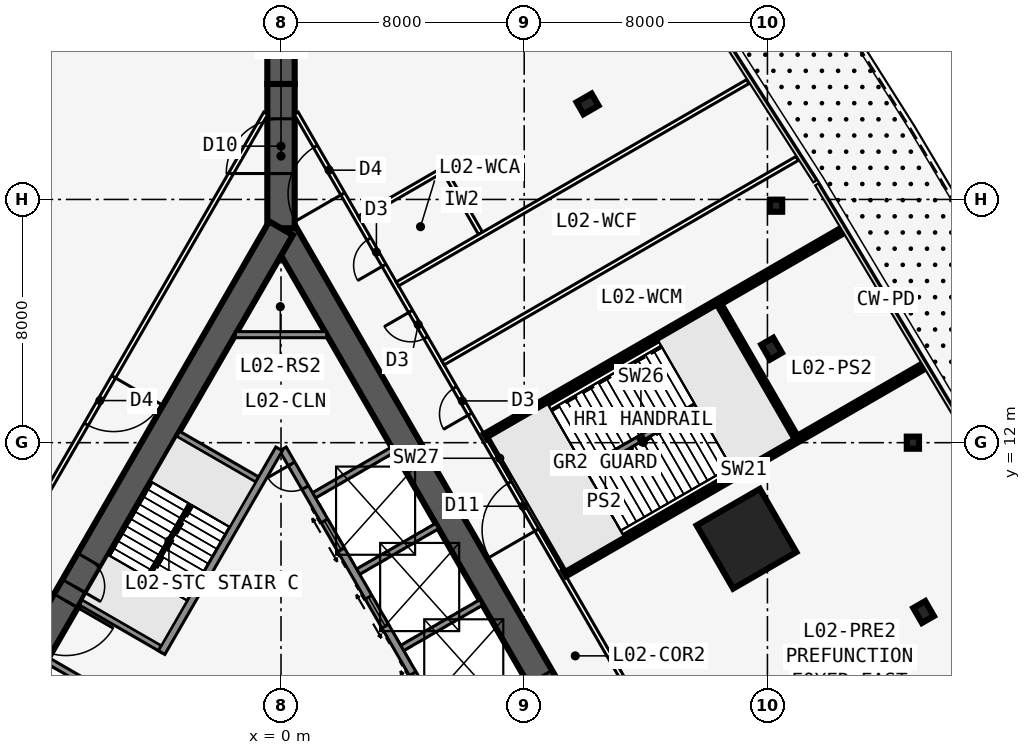
"""IFC4 building model, lengths in metres.
Left out: names, types, materials, properties, quantities, classifications, styles, units other than length and angle.
Written with IfcOpenShell. Run it as: python <this file> out.ifc"""

import sys

from ifc_helpers import new_model, si_unit, direction, frame, frame_2d, origin, origin_2d, place, context, subcontext, project, spatial, rectangle, i_section, extrude, element, fill, save


model = new_model("IFC4")
c1 = context("Model", 3, precision=1e-05, world=origin(), true_north=direction((0.0, 1.0)))
c2 = subcontext(c1, "Body", "Model", "MODEL_VIEW")
j1 = project(units=[si_unit("LENGTHUNIT", "METRE"), si_unit("PLANEANGLEUNIT", "RADIAN")], contexts=[c1])
p1 = place(None, origin())
s1 = spatial("IfcSite", under=j1, at=p1, CompositionType="ELEMENT")
p2 = place(p1, origin())
s2 = spatial("IfcBuilding", under=s1, at=p2, CompositionType="ELEMENT")
p3 = place(p2, frame((0.0, 0.0, 11.0)))
s3 = spatial("IfcBuildingStorey", under=s2, at=p3, CompositionType="ELEMENT", Elevation=11.0)
p4 = place(p3, frame((16.5, -9.526, 0.0), z_axis=(0.0, 0.0, 1.0), x_axis=(-0.499999749417, 0.866025548458, 0.0)))
e1 = element("IfcWall", 1, at=p4, inside=s3, PredefinedType="SHEAR", context=c2, shape_type="SweptSolid", body=[
    extrude(rectangle(XDim=33.0, YDim=0.9, at=frame_2d((16.5, 0.0))), origin(), (0.0, 0.0, 1.0), 6.5),
])
p5 = place(p4, frame((14.15, 0.0, 0.0)))
e2 = element("IfcOpeningElement", 2, at=p5, cuts=e1, PredefinedType="OPENING", context=c2, shape_type="SweptSolid", body=[
    extrude(rectangle(XDim=1.8, YDim=2.13, at=frame_2d((0.9, 1.065))), frame((0.0, 0.46, 0.0), z_axis=(0.0, -1.0, 0.0), x_axis=(1.0, 0.0, 0.0)), (0.0, 0.0, 1.0), 0.92),
])
p6 = place(p4, frame((12.6, 0.0, 0.0)))
e3 = element("IfcOpeningElement", 3, at=p6, cuts=e1, PredefinedType="OPENING", context=c2, shape_type="SweptSolid", body=[
    extrude(rectangle(XDim=1.0, YDim=2.13, at=frame_2d((0.5, 1.065))), frame((0.0, 0.46, 0.0), z_axis=(0.0, -1.0, 0.0), x_axis=(1.0, 0.0, 0.0)), (0.0, 0.0, 1.0), 0.92),
])
p7 = place(p3, frame((5.379, 2.586, 0.0), z_axis=(0.0, 0.0, 1.0), x_axis=(-0.500001375892, 0.866024609411, 0.0)))
e4 = element("IfcWall", 4, at=p7, inside=s3, PredefinedType="SOLIDWALL", context=c2, shape_type="SweptSolid", body=[
    extrude(rectangle(XDim=10.633, YDim=0.25, at=frame_2d((5.316, 0.0))), origin(), (0.0, 0.0, 1.0), 6.25),
])
p8 = place(p7, frame((9.164, 0.0, 0.0)))
e5 = element("IfcOpeningElement", 5, at=p8, cuts=e4, PredefinedType="OPENING", context=c2, shape_type="SweptSolid", body=[
    extrude(rectangle(XDim=0.9, YDim=2.13, at=frame_2d((0.45, 1.065))), frame((0.0, 0.135, 0.0), z_axis=(0.0, -1.0, 0.0), x_axis=(1.0, 0.0, 0.0)), (0.0, 0.0, 1.0), 0.27),
])
p9 = place(p7, frame((1.0, 0.0, 0.0)))
e6 = element("IfcOpeningElement", 6, at=p9, cuts=e4, PredefinedType="OPENING", context=c2, shape_type="SweptSolid", body=[
    extrude(rectangle(XDim=1.1, YDim=2.13, at=frame_2d((0.55, 1.065))), frame((0.0, 0.135, 0.0), z_axis=(0.0, -1.0, 0.0), x_axis=(1.0, 0.0, 0.0)), (0.0, 0.0, 1.0), 0.27),
])
p10 = place(p7, frame((3.9, 0.0, 0.0)))
e7 = element("IfcOpeningElement", 7, at=p10, cuts=e4, PredefinedType="OPENING", context=c2, shape_type="SweptSolid", body=[
    extrude(rectangle(XDim=1.1, YDim=2.13, at=frame_2d((0.55, 1.065))), frame((0.0, 0.135, 0.0), z_axis=(0.0, -1.0, 0.0), x_axis=(1.0, 0.0, 0.0)), (0.0, 0.0, 1.0), 0.27),
])
p11 = place(p7, frame((6.8, 0.0, 0.0)))
e8 = element("IfcOpeningElement", 8, at=p11, cuts=e4, PredefinedType="OPENING", context=c2, shape_type="SweptSolid", body=[
    extrude(rectangle(XDim=1.1, YDim=2.13, at=frame_2d((0.55, 1.065))), frame((0.0, 0.135, 0.0), z_axis=(0.0, -1.0, 0.0), x_axis=(1.0, 0.0, 0.0)), (0.0, 0.0, 1.0), 0.27),
])
for number, where, z_axis, x_axis in (
    (9, (3.879, 5.184, 0.0), (0.0, 0.0, 1.0), (0.866, 0.5, 0.0)),
    (10, (2.429, 7.696, 0.0), (0.0, 0.0, 1.0), (0.866, 0.5, 0.0)),
    (11, (0.979, 10.207, 0.0), (0.0, 0.0, 1.0), (0.866, 0.5, 0.0)),
):
    element("IfcWall", number, at=place(p3, frame(where, z_axis=z_axis, x_axis=x_axis)), inside=s3, PredefinedType="SOLIDWALL", context=c2, shape_type="SweptSolid", body=[
        extrude(rectangle(XDim=3.125, YDim=0.2, at=frame_2d((1.562, 0.0))), origin(), (0.0, 0.0, 1.0), 6.25),
    ])
p12 = place(p3, frame((0.0, 19.052, 0.0), z_axis=(0.0, 0.0, 1.0), x_axis=(-0.499999749417, -0.866025548458, 0.0)))
e12 = element("IfcWall", 12, at=p12, inside=s3, PredefinedType="SHEAR", context=c2, shape_type="SweptSolid", body=[
    extrude(rectangle(XDim=33.0, YDim=0.9, at=frame_2d((16.5, 0.0))), origin(), (0.0, 0.0, 1.0), 6.5),
])
p13 = place(p12, frame((14.15, 0.0, 0.0)))
e13 = element("IfcOpeningElement", 13, at=p13, cuts=e12, PredefinedType="OPENING", context=c2, shape_type="SweptSolid", body=[
    extrude(rectangle(XDim=1.8, YDim=2.13, at=frame_2d((0.9, 1.065))), frame((0.0, 0.46, 0.0), z_axis=(0.0, -1.0, 0.0), x_axis=(1.0, 0.0, 0.0)), (0.0, 0.0, 1.0), 0.92),
])
p14 = place(p12, frame((12.6, 0.0, 0.0)))
e14 = element("IfcOpeningElement", 14, at=p14, cuts=e12, PredefinedType="OPENING", context=c2, shape_type="SweptSolid", body=[
    extrude(rectangle(XDim=1.0, YDim=2.13, at=frame_2d((0.5, 1.065))), frame((0.0, 0.46, 0.0), z_axis=(0.0, -1.0, 0.0), x_axis=(1.0, 0.0, 0.0)), (0.0, 0.0, 1.0), 0.92),
])
p15 = place(p3, frame((-0.062, 11.794, 0.0), z_axis=(0.0, 0.0, 1.0), x_axis=(-0.500006680225, -0.86602154692, 0.0)))
e15 = element("IfcWall", 15, at=p15, inside=s3, PredefinedType="SOLIDWALL", context=c2, shape_type="SweptSolid", body=[
    extrude(rectangle(XDim=7.733, YDim=0.25, at=frame_2d((3.866, 0.0))), origin(), (0.0, 0.0, 1.0), 6.25),
])
for number, where, z_axis, x_axis in (
    (16, (-0.679, 10.727, 0.0), (0.0, 0.0, 1.0), (-0.866, 0.5, 0.0)),
    (17, (-3.879, 5.184, 0.0), (0.0, 0.0, 1.0), (-0.866, 0.5, 0.0)),
    (18, (-4.979, 3.279, 0.0), (0.0, 0.0, 1.0), (-0.866, 0.5, 0.0)),
):
    element("IfcWall", number, at=place(p3, frame(where, z_axis=z_axis, x_axis=x_axis)), inside=s3, PredefinedType="SOLIDWALL", context=c2, shape_type="SweptSolid", body=[
        extrude(rectangle(XDim=3.125, YDim=0.2, at=frame_2d((1.562, 0.0))), origin(), (0.0, 0.0, 1.0), 6.25),
    ])
p16 = place(p3, frame((0.0, 19.052, 0.0), z_axis=(0.0, 0.0, 1.0), x_axis=(0.0, 1.0, 0.0)))
e19 = element("IfcWall", 19, at=p16, inside=s3, PredefinedType="SHEAR", context=c2, shape_type="SweptSolid", body=[
    extrude(rectangle(XDim=4.746, YDim=0.9, at=frame_2d((2.373, 0.0))), origin(), (0.0, 0.0, 1.0), 6.5),
])
p17 = place(p16, frame((1.8, 0.0, 0.0)))
e20 = element("IfcOpeningElement", 20, at=p17, cuts=e19, PredefinedType="OPENING", context=c2, shape_type="SweptSolid", body=[
    extrude(rectangle(XDim=1.8, YDim=2.13, at=frame_2d((0.9, 1.065))), frame((0.0, 0.46, 0.0), z_axis=(0.0, -1.0, 0.0), x_axis=(1.0, 0.0, 0.0)), (0.0, 0.0, 1.0), 0.92),
])
p18 = place(p3, frame((0.0, 23.799, 0.0), z_axis=(0.0, 0.0, 1.0), x_axis=(0.0, 1.0, 0.0)))
e21 = element("IfcWall", 21, at=p18, inside=s3, PredefinedType="SHEAR", context=c2, shape_type="SweptSolid", body=[
    extrude(rectangle(XDim=1.155, YDim=0.9, at=frame_2d((0.577, 0.0))), origin(), (0.0, 0.0, 1.0), 6.5),
])
for number, where, z_axis, x_axis in (
    (22, (21.137, 6.43, 0.0), (0.0, 0.0, 1.0), (0.866, 0.5, 0.0)),
    (23, (16.137, 15.09, 0.0), (0.0, 0.0, 1.0), (0.866, 0.5, 0.0)),
    (24, (10.083, 23.142, 0.0), (0.0, 0.0, 1.0), (-0.5, 0.866, 0.0)),
):
    element("IfcColumn", number, at=place(p3, frame(where, z_axis=z_axis, x_axis=x_axis)), inside=s3, PredefinedType="COLUMN", context=c2, shape_type="SweptSolid", body=[
        extrude(i_section(OverallWidth=0.455, OverallDepth=0.569, WebThickness=0.078, FlangeThickness=0.125, at=origin_2d()), origin(), (0.0, 0.0, 1.0), 6.5),
    ])
for number, where, z_axis, x_axis in (
    (25, (20.785, 12.0, 0.0), (0.0, 0.0, 1.0), (1.0, 0.0, 0.0)),
    (26, (16.285, 19.794, 0.0), (0.0, 0.0, 1.0), (1.0, 0.0, 0.0)),
):
    element("IfcColumn", number, at=place(p3, frame(where, z_axis=z_axis, x_axis=x_axis)), inside=s3, PredefinedType="COLUMN", context=c2, shape_type="SweptSolid", body=[
        extrude(i_section(OverallWidth=0.401, OverallDepth=0.399, WebThickness=0.025, FlangeThickness=0.04, at=origin_2d()), origin(), (0.0, 0.0, 1.0), 6.5),
    ])
p19 = place(p3, frame((15.312, 8.84, 0.0), z_axis=(0.0, 0.0, 1.0), x_axis=(0.866025403784, 0.5, 0.0)))
e27 = element("IfcColumn", 27, at=p19, inside=s3, PredefinedType="COLUMN", context=c2, shape_type="SweptSolid", body=[
    extrude(rectangle(XDim=2.4, YDim=2.4, at=origin_2d()), origin(), (0.0, 0.0, 1.0), 6.5),
])
p20 = place(p3, frame((20.027, -10.985, 0.0), z_axis=(0.0, 0.0, 1.0), x_axis=(-0.500001677587, 0.866024435227, 0.0)))
e28 = element("IfcWall", 28, at=p20, inside=s3, PredefinedType="PARTITIONING", context=c2, shape_type="SweptSolid", body=[
    extrude(rectangle(XDim=39.054, YDim=0.15, at=frame_2d((19.527, 0.0))), origin(), (0.0, 0.0, 1.0), 5.308),
])
p21 = place(p20, frame((10.013, 0.0, 0.0)))
e29 = element("IfcOpeningElement", 29, at=p21, cuts=e28, PredefinedType="OPENING", context=c2, shape_type="SweptSolid", body=[
    extrude(rectangle(XDim=1.8, YDim=2.13, at=frame_2d((0.9, 1.065))), frame((0.0, 0.085, 0.0), z_axis=(0.0, -1.0, 0.0), x_axis=(1.0, 0.0, 0.0)), (0.0, 0.0, 1.0), 0.17),
])
p22 = place(p20, frame((23.227, 0.0, 0.0)))
e30 = element("IfcOpeningElement", 30, at=p22, cuts=e28, PredefinedType="OPENING", context=c2, shape_type="SweptSolid", body=[
    extrude(rectangle(XDim=1.8, YDim=2.13, at=frame_2d((0.9, 1.065))), frame((0.0, 0.085, 0.0), z_axis=(0.0, -1.0, 0.0), x_axis=(1.0, 0.0, 0.0)), (0.0, 0.0, 1.0), 0.17),
])
p23 = place(p20, frame((27.627, 0.0, 0.0)))
e31 = element("IfcOpeningElement", 31, at=p23, cuts=e28, PredefinedType="OPENING", context=c2, shape_type="SweptSolid", body=[
    extrude(rectangle(XDim=1.0, YDim=2.13, at=frame_2d((0.5, 1.065))), frame((0.0, 0.085, 0.0), z_axis=(0.0, -1.0, 0.0), x_axis=(1.0, 0.0, 0.0)), (0.0, 0.0, 1.0), 0.17),
])
p24 = place(p20, frame((30.527, 0.0, 0.0)))
e32 = element("IfcOpeningElement", 32, at=p24, cuts=e28, PredefinedType="OPENING", context=c2, shape_type="SweptSolid", body=[
    extrude(rectangle(XDim=1.0, YDim=2.13, at=frame_2d((0.5, 1.065))), frame((0.0, 0.085, 0.0), z_axis=(0.0, -1.0, 0.0), x_axis=(1.0, 0.0, 0.0)), (0.0, 0.0, 1.0), 0.17),
])
p25 = place(p20, frame((33.277, 0.0, 0.0)))
e33 = element("IfcOpeningElement", 33, at=p25, cuts=e28, PredefinedType="OPENING", context=c2, shape_type="SweptSolid", body=[
    extrude(rectangle(XDim=1.0, YDim=2.13, at=frame_2d((0.5, 1.065))), frame((0.0, 0.085, 0.0), z_axis=(0.0, -1.0, 0.0), x_axis=(1.0, 0.0, 0.0)), (0.0, 0.0, 1.0), 0.17),
])
p26 = place(p20, frame((35.99, 0.0, 0.0)))
e34 = element("IfcOpeningElement", 34, at=p26, cuts=e28, PredefinedType="OPENING", context=c2, shape_type="SweptSolid", body=[
    extrude(rectangle(XDim=1.8, YDim=2.13, at=frame_2d((0.9, 1.065))), frame((0.0, 0.085, 0.0), z_axis=(0.0, -1.0, 0.0), x_axis=(1.0, 0.0, 0.0)), (0.0, 0.0, 1.0), 0.17),
])
p27 = place(p3, frame((9.329, 7.695, 0.0), z_axis=(0.0, 0.0, 1.0), x_axis=(0.866029620801, 0.499992695841, 0.0)))
e35 = element("IfcWall", 35, at=p27, inside=s3, PredefinedType="SHEAR", context=c2, shape_type="SweptSolid", body=[
    extrude(rectangle(XDim=13.607, YDim=0.2, at=frame_2d((6.804, 0.0))), origin(), (0.0, 0.0, 1.0), 6.5),
])
p28 = place(p3, frame((6.729, 12.198, 0.0), z_axis=(0.0, 0.0, 1.0), x_axis=(0.866022969634, 0.500004216049, 0.0)))
e36 = element("IfcWall", 36, at=p28, inside=s3, PredefinedType="SHEAR", context=c2, shape_type="SweptSolid", body=[
    extrude(rectangle(XDim=13.526, YDim=0.2, at=frame_2d((6.763, 0.0))), origin(), (0.0, 0.0, 1.0), 6.5),
])
p29 = place(p3, frame((5.329, 14.623, 0.0), z_axis=(0.0, 0.0, 1.0), x_axis=(0.866024753221, 0.500001126807, 0.0)))
e37 = element("IfcWall", 37, at=p29, inside=s3, PredefinedType="PARTITIONING", context=c2, shape_type="SweptSolid", body=[
    extrude(rectangle(XDim=13.448, YDim=0.15, at=frame_2d((6.724, 0.0))), origin(), (0.0, 0.0, 1.0), 5.308),
])
p30 = place(p3, frame((3.829, 17.221, 0.0), z_axis=(0.0, 0.0, 1.0), x_axis=(0.866019382877, 0.500010428373, 0.0)))
e38 = element("IfcWall", 38, at=p30, inside=s3, PredefinedType="PARTITIONING", context=c2, shape_type="SweptSolid", body=[
    extrude(rectangle(XDim=13.307, YDim=0.15, at=frame_2d((6.654, 0.0))), origin(), (0.0, 0.0, 1.0), 6.25),
])
p31 = place(p3, frame((6.562, 18.886, 0.0), z_axis=(0.0, 0.0, 1.0), x_axis=(-0.500004234368, 0.866022959057, 0.0)))
e39 = element("IfcWall", 39, at=p31, inside=s3, PredefinedType="PARTITIONING", context=c2, shape_type="SweptSolid", body=[
    extrude(rectangle(XDim=2.5, YDim=0.15, at=frame_2d((1.25, 0.0))), origin(), (0.0, 0.0, 1.0), 6.25),
])
p32 = place(p3, frame((2.579, 19.386, 0.0), z_axis=(0.0, 0.0, 1.0), x_axis=(0.866022959057, 0.500004234368, 0.0)))
e40 = element("IfcWall", 40, at=p32, inside=s3, PredefinedType="PARTITIONING", context=c2, shape_type="SweptSolid", body=[
    extrude(rectangle(XDim=3.125, YDim=0.15, at=frame_2d((1.562, 0.0))), origin(), (0.0, 0.0, 1.0), 6.25),
])
p33 = place(p3, frame((-0.5, 22.836, 0.0), z_axis=(0.0, 0.0, 1.0), x_axis=(-0.500001677587, -0.866024435227, 0.0)))
e41 = element("IfcWall", 41, at=p33, inside=s3, PredefinedType="PARTITIONING", context=c2, shape_type="SweptSolid", body=[
    extrude(rectangle(XDim=39.054, YDim=0.15, at=frame_2d((19.527, 0.0))), origin(), (0.0, 0.0, 1.0), 5.308),
])
p34 = place(p33, frame((10.013, 0.0, 0.0)))
e42 = element("IfcOpeningElement", 42, at=p34, cuts=e41, PredefinedType="OPENING", context=c2, shape_type="SweptSolid", body=[
    extrude(rectangle(XDim=1.8, YDim=2.13, at=frame_2d((0.9, 1.065))), frame((0.0, 0.085, 0.0), z_axis=(0.0, -1.0, 0.0), x_axis=(1.0, 0.0, 0.0)), (0.0, 0.0, 1.0), 0.17),
])
p35 = place(p33, frame((23.227, 0.0, 0.0)))
e43 = element("IfcOpeningElement", 43, at=p35, cuts=e41, PredefinedType="OPENING", context=c2, shape_type="SweptSolid", body=[
    extrude(rectangle(XDim=1.8, YDim=2.13, at=frame_2d((0.9, 1.065))), frame((0.0, 0.085, 0.0), z_axis=(0.0, -1.0, 0.0), x_axis=(1.0, 0.0, 0.0)), (0.0, 0.0, 1.0), 0.17),
])
p36 = place(p33, frame((27.627, 0.0, 0.0)))
e44 = element("IfcOpeningElement", 44, at=p36, cuts=e41, PredefinedType="OPENING", context=c2, shape_type="SweptSolid", body=[
    extrude(rectangle(XDim=1.0, YDim=2.13, at=frame_2d((0.5, 1.065))), frame((0.0, 0.085, 0.0), z_axis=(0.0, -1.0, 0.0), x_axis=(1.0, 0.0, 0.0)), (0.0, 0.0, 1.0), 0.17),
])
p37 = place(p33, frame((30.277, 0.0, 0.0)))
e45 = element("IfcOpeningElement", 45, at=p37, cuts=e41, PredefinedType="OPENING", context=c2, shape_type="SweptSolid", body=[
    extrude(rectangle(XDim=1.0, YDim=2.13, at=frame_2d((0.5, 1.065))), frame((0.0, 0.085, 0.0), z_axis=(0.0, -1.0, 0.0), x_axis=(1.0, 0.0, 0.0)), (0.0, 0.0, 1.0), 0.17),
])
p38 = place(p33, frame((34.89, 0.0, 0.0)))
e46 = element("IfcOpeningElement", 46, at=p38, cuts=e41, PredefinedType="OPENING", context=c2, shape_type="SweptSolid", body=[
    extrude(rectangle(XDim=1.0, YDim=2.13, at=frame_2d((0.5, 1.065))), frame((0.0, 0.085, 0.0), z_axis=(0.0, -1.0, 0.0), x_axis=(1.0, 0.0, 0.0)), (0.0, 0.0, 1.0), 0.17),
])
p39 = place(p3, frame((-1.501, 15.552, 0.0), z_axis=(0.0, 0.0, 1.0), x_axis=(1.0, 0.0, 0.0)))
e47 = element("IfcWall", 47, at=p39, inside=s3, PredefinedType="SOLIDWALL", context=c2, shape_type="SweptSolid", body=[
    extrude(rectangle(XDim=3.002, YDim=0.2, at=frame_2d((1.501, 0.0))), origin(), (0.0, 0.0, 1.0), 6.25),
])
p40 = place(p3, frame((-2.988, 9.978, 0.0), z_axis=(0.0, 0.0, 1.0), x_axis=(-0.499992232847, -0.866029888106, 0.0)))
e48 = element("IfcWall", 48, at=p40, inside=s3, PredefinedType="SOLIDWALL", context=c2, shape_type="SweptSolid", body=[
    extrude(rectangle(XDim=2.794, YDim=0.1, at=frame_2d((1.397, 0.0))), origin(), (0.0, 0.0, 1.0), 6.5),
])
p41 = place(p3, frame((16.949, 12.095, 0.0), z_axis=(0.0, 0.0, 1.0), x_axis=(-0.499992051641, 0.866029992723, 0.0)))
e49 = element("IfcWall", 49, at=p41, inside=s3, PredefinedType="SHEAR", context=c2, shape_type="SweptSolid", body=[
    extrude(rectangle(XDim=5.2, YDim=0.2, at=frame_2d((2.6, 0.0))), origin(), (0.0, 0.0, 1.0), 6.5),
])
p42 = place(p3, frame((9.322, 7.807, 0.0), z_axis=(0.0, 0.0, 1.0), x_axis=(-0.500060622324, 0.86599040064, 0.0)))
e50 = element("IfcWall", 50, at=p42, inside=s3, PredefinedType="SOLIDWALL", context=c2, shape_type="SweptSolid", body=[
    extrude(rectangle(XDim=1.5, YDim=0.1, at=frame_2d((0.75, 0.0))), origin(), (0.0, 0.0, 1.0), 6.5),
])
p43 = place(p3, frame((7.572, 10.838, 0.0), z_axis=(0.0, 0.0, 1.0), x_axis=(-0.499990139034, 0.866031096941, 0.0)))
e51 = element("IfcWall", 51, at=p43, inside=s3, PredefinedType="SOLIDWALL", context=c2, shape_type="SweptSolid", body=[
    extrude(rectangle(XDim=1.5, YDim=0.1, at=frame_2d((0.75, 0.0))), origin(), (0.0, 0.0, 1.0), 6.5),
])
p44 = place(p3, frame((10.023, 11.098, 0.0), z_axis=(0.0, 0.0, 1.0), x_axis=(0.866031452229, 0.49998952364, 0.0)))
e52 = element("IfcWall", 52, at=p44, inside=s3, PredefinedType="SOLIDWALL", context=c2, shape_type="SweptSolid", body=[
    extrude(rectangle(XDim=4.194, YDim=0.2, at=frame_2d((2.097, 0.0))), origin(), (0.0, 0.0, 1.0), 6.5),
])
p45 = place(p22, origin())
e53 = element("IfcDoor", 53, at=p45, inside=s3, OperationType="DOUBLE_DOOR_SINGLE_SWING", PredefinedType="DOOR", context=c2, shape_type="SweptSolid", body=[
    extrude(rectangle(XDim=1.8, YDim=2.13, at=frame_2d((0.9, 1.065))), frame((0.0, 0.025, 0.0), z_axis=(0.0, -1.0, 0.0), x_axis=(1.0, 0.0, 0.0)), (0.0, 0.0, 1.0), 0.05),
])
fill(e30, e53)
p46 = place(p23, origin())
e54 = element("IfcDoor", 54, at=p46, inside=s3, OperationType="SINGLE_SWING_LEFT", PredefinedType="DOOR", context=c2, shape_type="SweptSolid", body=[
    extrude(rectangle(XDim=1.0, YDim=2.13, at=frame_2d((0.5, 1.065))), frame((0.0, 0.025, 0.0), z_axis=(0.0, -1.0, 0.0), x_axis=(1.0, 0.0, 0.0)), (0.0, 0.0, 1.0), 0.05),
])
fill(e31, e54)
p47 = place(p24, origin())
e55 = element("IfcDoor", 55, at=p47, inside=s3, OperationType="SINGLE_SWING_RIGHT", PredefinedType="DOOR", context=c2, shape_type="SweptSolid", body=[
    extrude(rectangle(XDim=1.0, YDim=2.13, at=frame_2d((0.5, 1.065))), frame((0.0, 0.025, 0.0), z_axis=(0.0, -1.0, 0.0), x_axis=(1.0, 0.0, 0.0)), (0.0, 0.0, 1.0), 0.05),
])
fill(e32, e55)
p48 = place(p25, origin())
e56 = element("IfcDoor", 56, at=p48, inside=s3, OperationType="SINGLE_SWING_LEFT", PredefinedType="DOOR", context=c2, shape_type="SweptSolid", body=[
    extrude(rectangle(XDim=1.0, YDim=2.13, at=frame_2d((0.5, 1.065))), frame((0.0, 0.025, 0.0), z_axis=(0.0, -1.0, 0.0), x_axis=(1.0, 0.0, 0.0)), (0.0, 0.0, 1.0), 0.05),
])
fill(e33, e56)
p49 = place(p26, origin())
e57 = element("IfcDoor", 57, at=p49, inside=s3, OperationType="DOUBLE_DOOR_SINGLE_SWING", PredefinedType="DOOR", context=c2, shape_type="SweptSolid", body=[
    extrude(rectangle(XDim=1.8, YDim=2.13, at=frame_2d((0.9, 1.065))), frame((0.0, 0.025, 0.0), z_axis=(0.0, -1.0, 0.0), x_axis=(1.0, 0.0, 0.0)), (0.0, 0.0, 1.0), 0.05),
])
fill(e34, e57)
p50 = place(p34, origin())
e58 = element("IfcDoor", 58, at=p50, inside=s3, OperationType="DOUBLE_DOOR_SINGLE_SWING", PredefinedType="DOOR", context=c2, shape_type="SweptSolid", body=[
    extrude(rectangle(XDim=1.8, YDim=2.13, at=frame_2d((0.9, 1.065))), frame((0.0, 0.025, 0.0), z_axis=(0.0, -1.0, 0.0), x_axis=(1.0, 0.0, 0.0)), (0.0, 0.0, 1.0), 0.05),
])
fill(e42, e58)
p51 = place(p13, origin())
e59 = element("IfcDoor", 59, at=p51, inside=s3, OperationType="DOUBLE_DOOR_SINGLE_SWING", PredefinedType="DOOR", context=c2, shape_type="SweptSolid", body=[
    extrude(rectangle(XDim=1.8, YDim=2.13, at=frame_2d((0.9, 1.065))), frame((0.0, 0.025, 0.0), z_axis=(0.0, -1.0, 0.0), x_axis=(1.0, 0.0, 0.0)), (0.0, 0.0, 1.0), 0.05),
])
fill(e13, e59)
p52 = place(p14, origin())
e60 = element("IfcDoor", 60, at=p52, inside=s3, OperationType="SINGLE_SWING_RIGHT", PredefinedType="DOOR", context=c2, shape_type="SweptSolid", body=[
    extrude(rectangle(XDim=1.0, YDim=2.13, at=frame_2d((0.5, 1.065))), frame((0.0, 0.025, 0.0), z_axis=(0.0, -1.0, 0.0), x_axis=(1.0, 0.0, 0.0)), (0.0, 0.0, 1.0), 0.05),
])
fill(e14, e60)
p53 = place(p17, origin())
e61 = element("IfcDoor", 61, at=p53, inside=s3, OperationType="DOUBLE_DOOR_DOUBLE_SWING", PredefinedType="DOOR", context=c2, shape_type="SweptSolid", body=[
    extrude(rectangle(XDim=1.8, YDim=2.13, at=frame_2d((0.9, 1.065))), frame((0.0, 0.025, 0.0), z_axis=(0.0, -1.0, 0.0), x_axis=(1.0, 0.0, 0.0)), (0.0, 0.0, 1.0), 0.05),
])
fill(e20, e61)
p54 = place(p8, origin())
e62 = element("IfcDoor", 62, at=p54, inside=s3, OperationType="SINGLE_SWING_RIGHT", PredefinedType="DOOR", context=c2, shape_type="SweptSolid", body=[
    extrude(rectangle(XDim=0.9, YDim=2.13, at=frame_2d((0.45, 1.065))), frame((0.0, 0.025, 0.0), z_axis=(0.0, -1.0, 0.0), x_axis=(1.0, 0.0, 0.0)), (0.0, 0.0, 1.0), 0.05),
])
fill(e5, e62)
p55 = place(p9, origin())
e63 = element("IfcDoor", 63, at=p55, inside=s3, OperationType="DOUBLE_DOOR_SLIDING", PredefinedType="USERDEFINED", context=c2, shape_type="SweptSolid", body=[
    extrude(rectangle(XDim=1.1, YDim=2.13, at=frame_2d((0.55, 1.065))), frame((0.0, 0.025, 0.0), z_axis=(0.0, -1.0, 0.0), x_axis=(1.0, 0.0, 0.0)), (0.0, 0.0, 1.0), 0.05),
])
fill(e6, e63)
p56 = place(p10, origin())
e64 = element("IfcDoor", 64, at=p56, inside=s3, OperationType="DOUBLE_DOOR_SLIDING", PredefinedType="USERDEFINED", context=c2, shape_type="SweptSolid", body=[
    extrude(rectangle(XDim=1.1, YDim=2.13, at=frame_2d((0.55, 1.065))), frame((0.0, 0.025, 0.0), z_axis=(0.0, -1.0, 0.0), x_axis=(1.0, 0.0, 0.0)), (0.0, 0.0, 1.0), 0.05),
])
fill(e7, e64)
p57 = place(p11, origin())
e65 = element("IfcDoor", 65, at=p57, inside=s3, OperationType="DOUBLE_DOOR_SLIDING", PredefinedType="USERDEFINED", context=c2, shape_type="SweptSolid", body=[
    extrude(rectangle(XDim=1.1, YDim=2.13, at=frame_2d((0.55, 1.065))), frame((0.0, 0.025, 0.0), z_axis=(0.0, -1.0, 0.0), x_axis=(1.0, 0.0, 0.0)), (0.0, 0.0, 1.0), 0.05),
])
fill(e8, e65)
save(model, sys.argv[1])
